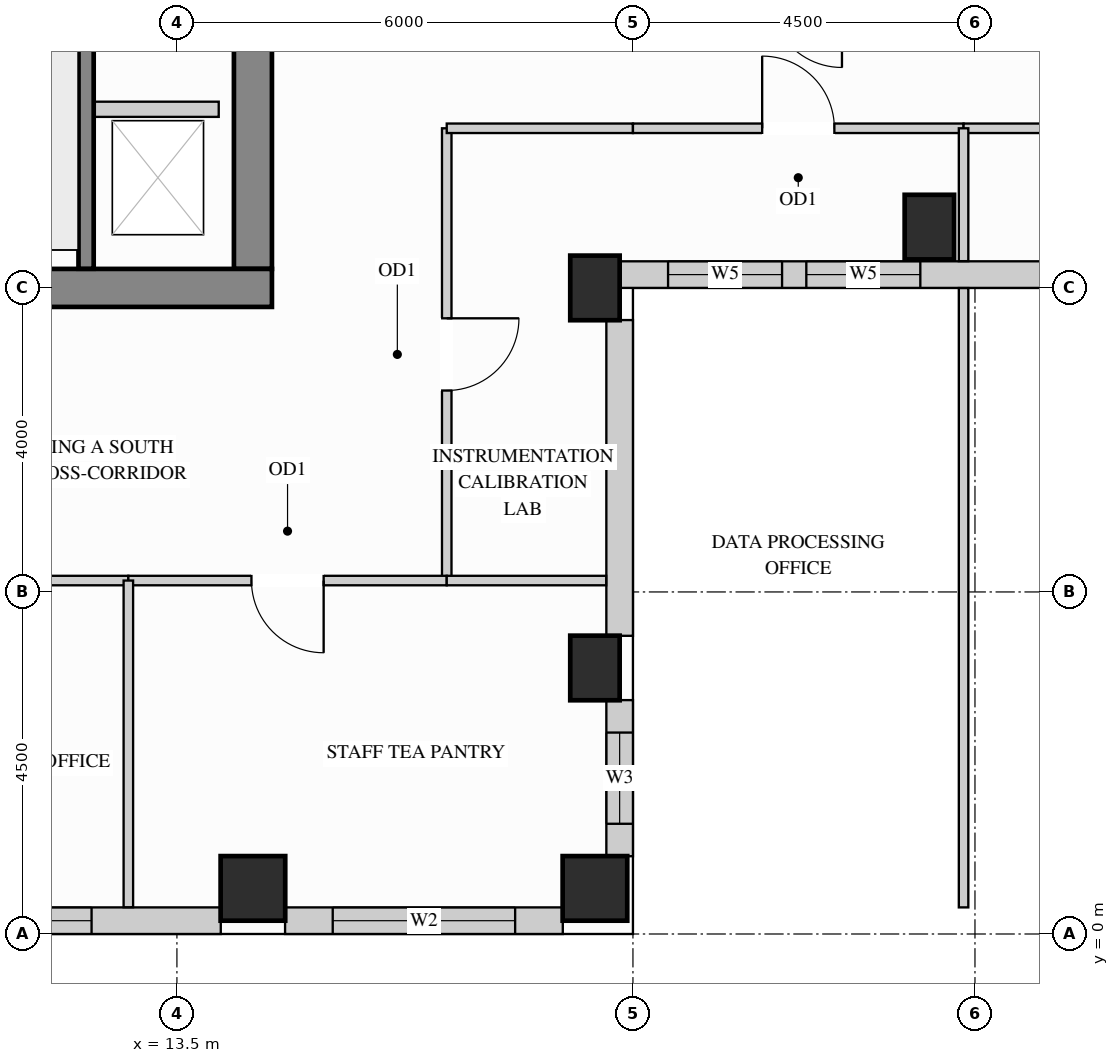
"""IFC4 building model, lengths in metres.
Left out: names, types, materials, properties, quantities, classifications, styles, units other than length and angle.
Written with IfcOpenShell. Run it as: python <this file> out.ifc"""

import sys

from ifc_helpers import new_model, si_unit, direction, frame, frame_2d, origin, origin_2d, place, context, subcontext, project, spatial, rectangle, extrude, source, transform, mapped, element, fill, save


model = new_model("IFC4")
c1 = context("Model", 3, precision=1e-05, world=origin(), true_north=direction((0.0, 1.0)))
c2 = subcontext(c1, "Body", "Model", "MODEL_VIEW")
j1 = project(units=[si_unit("LENGTHUNIT", "METRE"), si_unit("PLANEANGLEUNIT", "RADIAN")], contexts=[c1])
p1 = place(None, origin())
s1 = spatial("IfcSite", under=j1, at=p1, CompositionType="ELEMENT")
p2 = place(p1, origin())
s2 = spatial("IfcBuilding", under=s1, at=p2, CompositionType="ELEMENT")
p3 = place(p2, frame((0.0, 0.0, 230.4)))
s3 = spatial("IfcBuildingStorey", under=s2, at=p3, CompositionType="ELEMENT", Elevation=230.4)
m1 = source(origin(), c2, "Body", "SweptSolid", [
    extrude(rectangle(XDim=0.65, YDim=0.85, at=origin_2d()), origin(), (0.0, 0.0, 1.0), 3.4),
])
for number, where, z_axis, x_axis in (
    (1, (19.0, 3.5, 0.0), (0.0, 0.0, 1.0), (1.0, 0.0, 0.0)),
    (2, (19.0, 8.5, 0.0), (0.0, 0.0, 1.0), (1.0, 0.0, 0.0)),
    (3, (23.4, 9.3, 0.0), (0.0, 0.0, 1.0), (1.0, 0.0, 0.0)),
):
    element("IfcColumn", number, at=place(p3, frame(where, z_axis=z_axis, x_axis=x_axis)), inside=s3, PredefinedType="COLUMN", context=c2, shape_type="MappedRepresentation", body=[
        mapped(m1, transform((0.0, 0.0, 0.0), x_axis=(1.0, 0.0, 0.0), y_axis=(0.0, 1.0, 0.0), z_axis=(0.0, 0.0, 1.0))),
    ])
m2 = source(origin(), c2, "Body", "SweptSolid", [
    extrude(rectangle(XDim=0.85, YDim=0.85, at=origin_2d()), origin(), (0.0, 0.0, 1.0), 3.4),
])
for number, where, z_axis, x_axis in (
    (4, (14.5, 0.6, 0.0), (0.0, 0.0, 1.0), (1.0, 0.0, 0.0)),
    (5, (19.0, 0.6, 0.0), (0.0, 0.0, 1.0), (1.0, 0.0, 0.0)),
):
    element("IfcColumn", number, at=place(p3, frame(where, z_axis=z_axis, x_axis=x_axis)), inside=s3, PredefinedType="COLUMN", context=c2, shape_type="MappedRepresentation", body=[
        mapped(m2, transform((0.0, 0.0, 0.0), x_axis=(1.0, 0.0, 0.0), y_axis=(0.0, 1.0, 0.0), z_axis=(0.0, 0.0, 1.0))),
    ])
m3 = source(origin(), c2, "Body", "SweptSolid", [
    extrude(rectangle(XDim=10.07, YDim=0.5, at=frame_2d((5.035, 0.0))), origin(), (0.0, 0.0, 1.0), 3.4),
])
p4 = place(p3, frame((14.5, 8.75, 0.0), z_axis=(0.0, 0.0, 1.0), x_axis=(0.0, 1.0, 0.0)))
e6 = element("IfcWall", 6, at=p4, inside=s3, PredefinedType="SHEAR", context=c2, shape_type="MappedRepresentation", body=[
    mapped(m3, transform((0.0, 0.0, 0.0), x_axis=(1.0, 0.0, 0.0), y_axis=(0.0, 1.0, 0.0), z_axis=(0.0, 0.0, 1.0))),
])
m4 = source(origin(), c2, "Body", "SweptSolid", [
    extrude(rectangle(XDim=10.5, YDim=0.5, at=frame_2d((5.25, 0.0))), origin(), (0.0, 0.0, 1.0), 3.4),
])
p5 = place(p3, frame((4.25, 8.5, 0.0), z_axis=(0.0, 0.0, 1.0), x_axis=(1.0, 0.0, 0.0)))
e7 = element("IfcWall", 7, at=p5, inside=s3, PredefinedType="SHEAR", context=c2, shape_type="MappedRepresentation", body=[
    mapped(m4, transform((0.0, 0.0, 0.0), x_axis=(1.0, 0.0, 0.0), y_axis=(0.0, 1.0, 0.0), z_axis=(0.0, 0.0, 1.0))),
])
p6 = place(p3, frame((9.423, 0.175, 0.0), z_axis=(0.0, 0.0, 1.0), x_axis=(1.0, 0.0, 0.0)))
e8 = element("IfcWall", 8, at=p6, inside=s3, PredefinedType="SOLIDWALL", context=c2, shape_type="SweptSolid", body=[
    extrude(rectangle(XDim=4.654, YDim=0.35, at=frame_2d((2.327, 0.0))), origin(), (0.0, 0.0, 1.0), 3.385),
])
p7 = place(p6, frame((0.554, 0.0, 0.78)))
e9 = element("IfcOpeningElement", 9, at=p7, cuts=e8, PredefinedType="OPENING", context=c2, shape_type="SweptSolid", body=[
    extrude(rectangle(XDim=2.4, YDim=2.1, at=frame_2d((1.2, 1.05))), frame((0.0, 0.185, 0.0), z_axis=(0.0, -1.0, 0.0), x_axis=(1.0, 0.0, 0.0)), (0.0, 0.0, 1.0), 0.37),
])
p8 = place(p3, frame((14.923, 0.175, 0.0), z_axis=(0.0, 0.0, 1.0), x_axis=(1.0, 0.0, 0.0)))
e10 = element("IfcWall", 10, at=p8, inside=s3, PredefinedType="SOLIDWALL", context=c2, shape_type="SweptSolid", body=[
    extrude(rectangle(XDim=3.654, YDim=0.35, at=frame_2d((1.827, 0.0))), origin(), (0.0, 0.0, 1.0), 3.385),
])
p9 = place(p8, frame((0.627, 0.0, 0.78)))
e11 = element("IfcOpeningElement", 11, at=p9, cuts=e10, PredefinedType="OPENING", context=c2, shape_type="SweptSolid", body=[
    extrude(rectangle(XDim=2.4, YDim=2.1, at=frame_2d((1.2, 1.05))), frame((0.0, 0.185, 0.0), z_axis=(0.0, -1.0, 0.0), x_axis=(1.0, 0.0, 0.0)), (0.0, 0.0, 1.0), 0.37),
])
p10 = place(p3, frame((19.325, 1.023, 0.0), z_axis=(0.0, 0.0, 1.0), x_axis=(0.0, 1.0, 0.0)))
e12 = element("IfcWall", 12, at=p10, inside=s3, PredefinedType="SOLIDWALL", context=c2, shape_type="SweptSolid", body=[
    extrude(rectangle(XDim=2.054, YDim=0.35, at=frame_2d((1.027, 0.0))), origin(), (0.0, 0.0, 1.0), 2.619),
])
p11 = place(p10, frame((0.427, 0.0, 0.78)))
e13 = element("IfcOpeningElement", 13, at=p11, cuts=e12, PredefinedType="OPENING", context=c2, shape_type="SweptSolid", body=[
    extrude(rectangle(XDim=1.2, YDim=1.659, at=frame_2d((0.6, 0.83))), frame((0.0, 0.185, 0.0), z_axis=(0.0, -1.0, 0.0), x_axis=(1.0, 0.0, 0.0)), (0.0, 0.0, 1.0), 0.37),
])
m5 = source(origin(), c2, "Body", "SweptSolid", [
    extrude(rectangle(XDim=4.154, YDim=0.35, at=frame_2d((2.077, 0.0))), origin(), (0.0, 0.0, 1.0), 2.619),
])
p12 = place(p3, frame((19.325, 3.923, 0.0), z_axis=(0.0, 0.0, 1.0), x_axis=(0.0, 1.0, 0.0)))
e14 = element("IfcWall", 14, at=p12, inside=s3, PredefinedType="SOLIDWALL", context=c2, shape_type="MappedRepresentation", body=[
    mapped(m5, transform((0.0, 0.0, 0.0), x_axis=(1.0, 0.0, 0.0), y_axis=(0.0, 1.0, 0.0), z_axis=(0.0, 0.0, 1.0))),
])
p13 = place(p3, frame((19.323, 8.675, 0.0), z_axis=(0.0, 0.0, 1.0), x_axis=(1.0, 0.0, 0.0)))
e15 = element("IfcWall", 15, at=p13, inside=s3, PredefinedType="SOLIDWALL", context=c2, shape_type="SweptSolid", body=[
    extrude(rectangle(XDim=15.427, YDim=0.35, at=frame_2d((7.713, 0.0))), origin(), (0.0, 0.0, 1.0), 3.385),
])
p14 = place(p13, frame((0.639, 0.0, 0.78)))
e16 = element("IfcOpeningElement", 16, at=p14, cuts=e15, PredefinedType="OPENING", context=c2, shape_type="SweptSolid", body=[
    extrude(rectangle(XDim=1.5, YDim=2.0, at=frame_2d((0.75, 1.0))), frame((0.0, 0.185, 0.0), z_axis=(0.0, -1.0, 0.0), x_axis=(1.0, 0.0, 0.0)), (0.0, 0.0, 1.0), 0.37),
])
p15 = place(p13, frame((2.458, 0.0, 0.78)))
e17 = element("IfcOpeningElement", 17, at=p15, cuts=e15, PredefinedType="OPENING", context=c2, shape_type="SweptSolid", body=[
    extrude(rectangle(XDim=1.5, YDim=2.0, at=frame_2d((0.75, 1.0))), frame((0.0, 0.185, 0.0), z_axis=(0.0, -1.0, 0.0), x_axis=(1.0, 0.0, 0.0)), (0.0, 0.0, 1.0), 0.37),
])
p16 = place(p13, frame((5.61, 0.0, 0.78)))
e18 = element("IfcOpeningElement", 18, at=p16, cuts=e15, PredefinedType="OPENING", context=c2, shape_type="SweptSolid", body=[
    extrude(rectangle(XDim=1.5, YDim=2.0, at=frame_2d((0.75, 1.0))), frame((0.0, 0.185, 0.0), z_axis=(0.0, -1.0, 0.0), x_axis=(1.0, 0.0, 0.0)), (0.0, 0.0, 1.0), 0.37),
])
p17 = place(p13, frame((7.944, 0.0, 0.78)))
e19 = element("IfcOpeningElement", 19, at=p17, cuts=e15, PredefinedType="OPENING", context=c2, shape_type="SweptSolid", body=[
    extrude(rectangle(XDim=1.5, YDim=2.0, at=frame_2d((0.75, 1.0))), frame((0.0, 0.185, 0.0), z_axis=(0.0, -1.0, 0.0), x_axis=(1.0, 0.0, 0.0)), (0.0, 0.0, 1.0), 0.37),
])
p18 = place(p13, frame((11.22, 0.0, 0.78)))
e20 = element("IfcOpeningElement", 20, at=p18, cuts=e15, PredefinedType="OPENING", context=c2, shape_type="SweptSolid", body=[
    extrude(rectangle(XDim=1.5, YDim=2.0, at=frame_2d((0.75, 1.0))), frame((0.0, 0.185, 0.0), z_axis=(0.0, -1.0, 0.0), x_axis=(1.0, 0.0, 0.0)), (0.0, 0.0, 1.0), 0.37),
])
p19 = place(p13, frame((13.164, 0.0, 0.78)))
e21 = element("IfcOpeningElement", 21, at=p19, cuts=e15, PredefinedType="OPENING", context=c2, shape_type="SweptSolid", body=[
    extrude(rectangle(XDim=1.5, YDim=2.0, at=frame_2d((0.75, 1.0))), frame((0.0, 0.185, 0.0), z_axis=(0.0, -1.0, 0.0), x_axis=(1.0, 0.0, 0.0)), (0.0, 0.0, 1.0), 0.37),
])
p20 = place(p3, frame((17.05, 4.65, 0.0), z_axis=(0.0, 0.0, 1.0), x_axis=(0.0, 1.0, 0.0)))
e22 = element("IfcWall", 22, at=p20, inside=s3, PredefinedType="PARTITIONING", context=c2, shape_type="SweptSolid", body=[
    extrude(rectangle(XDim=5.95, YDim=0.125, at=frame_2d((2.975, 0.0))), origin(), (0.0, 0.0, 1.0), 3.385),
])
p21 = place(p20, frame((2.5, 0.0, 0.0)))
e23 = element("IfcOpeningElement", 23, at=p21, cuts=e22, PredefinedType="OPENING", context=c2, shape_type="SweptSolid", body=[
    extrude(rectangle(XDim=0.95, YDim=2.15, at=frame_2d((0.475, 1.075))), frame((0.0, 0.073, 0.0), z_axis=(0.0, -1.0, 0.0), x_axis=(1.0, 0.0, 0.0)), (0.0, 0.0, 1.0), 0.145),
])
m6 = source(origin(), c2, "Body", "SweptSolid", [
    extrude(rectangle(XDim=2.45, YDim=0.125, at=frame_2d((1.225, 0.0))), origin(), (0.0, 0.0, 1.0), 3.385),
])
p22 = place(p3, frame((17.05, 10.6, 0.0), z_axis=(0.0, 0.0, 1.0), x_axis=(1.0, 0.0, 0.0)))
e24 = element("IfcWall", 24, at=p22, inside=s3, PredefinedType="PARTITIONING", context=c2, shape_type="MappedRepresentation", body=[
    mapped(m6, transform((0.0, 0.0, 0.0), x_axis=(1.0, 0.0, 0.0), y_axis=(0.0, 1.0, 0.0), z_axis=(0.0, 0.0, 1.0))),
])
p23 = place(p3, frame((19.5, 10.6, 0.0), z_axis=(0.0, 0.0, 1.0), x_axis=(1.0, 0.0, 0.0)))
e25 = element("IfcWall", 25, at=p23, inside=s3, PredefinedType="PARTITIONING", context=c2, shape_type="SweptSolid", body=[
    extrude(rectangle(XDim=4.35, YDim=0.125, at=frame_2d((2.175, 0.0))), origin(), (0.0, 0.0, 1.0), 3.385),
])
p24 = place(p23, frame((1.7, 0.0, 0.0)))
e26 = element("IfcOpeningElement", 26, at=p24, cuts=e25, PredefinedType="OPENING", context=c2, shape_type="SweptSolid", body=[
    extrude(rectangle(XDim=0.95, YDim=2.15, at=frame_2d((0.475, 1.075))), frame((0.0, 0.073, 0.0), z_axis=(0.0, -1.0, 0.0), x_axis=(1.0, 0.0, 0.0)), (0.0, 0.0, 1.0), 0.145),
])
p25 = place(p3, frame((23.85, 10.6, 0.0), z_axis=(0.0, 0.0, 1.0), x_axis=(1.0, 0.0, 0.0)))
e27 = element("IfcWall", 27, at=p25, inside=s3, PredefinedType="PARTITIONING", context=c2, shape_type="SweptSolid", body=[
    extrude(rectangle(XDim=6.0, YDim=0.125, at=frame_2d((3.0, 0.0))), origin(), (0.0, 0.0, 1.0), 3.385),
])
p26 = place(p25, frame((2.525, 0.0, 0.0)))
e28 = element("IfcOpeningElement", 28, at=p26, cuts=e27, PredefinedType="OPENING", context=c2, shape_type="SweptSolid", body=[
    extrude(rectangle(XDim=0.95, YDim=2.15, at=frame_2d((0.475, 1.075))), frame((0.0, 0.073, 0.0), z_axis=(0.0, -1.0, 0.0), x_axis=(1.0, 0.0, 0.0)), (0.0, 0.0, 1.0), 0.145),
])
m7 = source(origin(), c2, "Body", "SweptSolid", [
    extrude(rectangle(XDim=8.148, YDim=0.125, at=frame_2d((4.074, 0.0))), origin(), (0.0, 0.0, 1.0), 3.385),
])
p27 = place(p3, frame((23.85, 0.35, 0.0), z_axis=(0.0, 0.0, 1.0), x_axis=(0.0, 1.0, 0.0)))
e29 = element("IfcWall", 29, at=p27, inside=s3, PredefinedType="PARTITIONING", context=c2, shape_type="MappedRepresentation", body=[
    mapped(m7, transform((0.0, 0.0, 0.0), x_axis=(1.0, 0.0, 0.0), y_axis=(0.0, 1.0, 0.0), z_axis=(0.0, 0.0, 1.0))),
])
m8 = source(origin(), c2, "Body", "SweptSolid", [
    extrude(rectangle(XDim=1.748, YDim=0.125, at=frame_2d((0.874, 0.0))), origin(), (0.0, 0.0, 1.0), 3.385),
])
p28 = place(p3, frame((23.85, 8.852, 0.0), z_axis=(0.0, 0.0, 1.0), x_axis=(0.0, 1.0, 0.0)))
e30 = element("IfcWall", 30, at=p28, inside=s3, PredefinedType="PARTITIONING", context=c2, shape_type="MappedRepresentation", body=[
    mapped(m8, transform((0.0, 0.0, 0.0), x_axis=(1.0, 0.0, 0.0), y_axis=(0.0, 1.0, 0.0), z_axis=(0.0, 0.0, 1.0))),
])
p29 = place(p3, frame((7.234, 4.65, 0.0), z_axis=(0.0, 0.0, 1.0), x_axis=(1.0, 0.0, 0.0)))
e31 = element("IfcWall", 31, at=p29, inside=s3, PredefinedType="PARTITIONING", context=c2, shape_type="SweptSolid", body=[
    extrude(rectangle(XDim=5.627, YDim=0.125, at=frame_2d((2.813, 0.0))), origin(), (0.0, 0.0, 1.0), 2.848),
])
p30 = place(p29, frame((2.338, 0.0, 0.0)))
e32 = element("IfcOpeningElement", 32, at=p30, cuts=e31, PredefinedType="OPENING", context=c2, shape_type="SweptSolid", body=[
    extrude(rectangle(XDim=0.95, YDim=2.15, at=frame_2d((0.475, 1.075))), frame((0.0, 0.073, 0.0), z_axis=(0.0, -1.0, 0.0), x_axis=(1.0, 0.0, 0.0)), (0.0, 0.0, 1.0), 0.145),
])
p31 = place(p3, frame((12.861, 4.65, 0.0), z_axis=(0.0, 0.0, 1.0), x_axis=(1.0, 0.0, 0.0)))
e33 = element("IfcWall", 33, at=p31, inside=s3, PredefinedType="PARTITIONING", context=c2, shape_type="SweptSolid", body=[
    extrude(rectangle(XDim=4.189, YDim=0.125, at=frame_2d((2.094, 0.0))), origin(), (0.0, 0.0, 1.0), 2.848),
])
p32 = place(p31, frame((1.619, 0.0, 0.0)))
e34 = element("IfcOpeningElement", 34, at=p32, cuts=e33, PredefinedType="OPENING", context=c2, shape_type="SweptSolid", body=[
    extrude(rectangle(XDim=0.95, YDim=2.15, at=frame_2d((0.475, 1.075))), frame((0.0, 0.073, 0.0), z_axis=(0.0, -1.0, 0.0), x_axis=(1.0, 0.0, 0.0)), (0.0, 0.0, 1.0), 0.145),
])
m9 = source(origin(), c2, "Body", "SweptSolid", [
    extrude(rectangle(XDim=2.098, YDim=0.125, at=frame_2d((1.049, 0.0))), origin(), (0.0, 0.0, 1.0), 2.848),
])
p33 = place(p3, frame((17.05, 4.65, 0.0), z_axis=(0.0, 0.0, 1.0), x_axis=(1.0, 0.0, 0.0)))
e35 = element("IfcWall", 35, at=p33, inside=s3, PredefinedType="PARTITIONING", context=c2, shape_type="MappedRepresentation", body=[
    mapped(m9, transform((0.0, 0.0, 0.0), x_axis=(1.0, 0.0, 0.0), y_axis=(0.0, 1.0, 0.0), z_axis=(0.0, 0.0, 1.0))),
])
m10 = source(origin(), c2, "Body", "SweptSolid", [
    extrude(rectangle(XDim=4.298, YDim=0.125, at=frame_2d((2.149, 0.0))), origin(), (0.0, 0.0, 1.0), 3.385),
])
p34 = place(p3, frame((12.861, 0.352, 0.0), z_axis=(0.0, 0.0, 1.0), x_axis=(0.0, 1.0, 0.0)))
e36 = element("IfcWall", 36, at=p34, inside=s3, PredefinedType="PARTITIONING", context=c2, shape_type="MappedRepresentation", body=[
    mapped(m10, transform((0.0, 0.0, 0.0), x_axis=(1.0, 0.0, 0.0), y_axis=(0.0, 1.0, 0.0), z_axis=(0.0, 0.0, 1.0))),
])
m11 = source(origin(), c2, "Body", "SweptSolid", [
    extrude(rectangle(XDim=1.63, YDim=0.2, at=frame_2d((0.815, 0.0))), origin(), (0.0, 0.0, 1.0), 3.385),
])
p35 = place(p3, frame((12.42, 10.85, 0.0), z_axis=(0.0, 0.0, 1.0), x_axis=(1.0, 0.0, 0.0)))
e37 = element("IfcWall", 37, at=p35, inside=s3, PredefinedType="PARTITIONING", context=c2, shape_type="MappedRepresentation", body=[
    mapped(m11, transform((0.0, 0.0, 0.0), x_axis=(1.0, 0.0, 0.0), y_axis=(0.0, 1.0, 0.0), z_axis=(0.0, 0.0, 1.0))),
])
m12 = source(origin(), c2, "Body", "SweptSolid", [
    extrude(rectangle(XDim=3.803, YDim=0.2, at=frame_2d((1.901, 0.0))), origin(), (0.0, 0.0, 1.0), 3.4),
])
p36 = place(p3, frame((12.305, 8.752, 0.0), z_axis=(0.0, 0.0, 1.0), x_axis=(0.0, 1.0, 0.0)))
e38 = element("IfcWall", 38, at=p36, inside=s3, PredefinedType="SHEAR", context=c2, shape_type="MappedRepresentation", body=[
    mapped(m12, transform((0.0, 0.0, 0.0), x_axis=(1.0, 0.0, 0.0), y_axis=(0.0, 1.0, 0.0), z_axis=(0.0, 0.0, 1.0))),
])
m13 = source(origin(), c2, "Body", "SweptSolid", [
    extrude(rectangle(XDim=0.95, YDim=2.15, at=frame_2d((0.475, 1.075))), frame((0.0, 0.025, 0.0), z_axis=(0.0, -1.0, 0.0), x_axis=(1.0, 0.0, 0.0)), (0.0, 0.0, 1.0), 0.05),
])
p37 = place(p21, origin())
e39 = element("IfcDoor", 39, at=p37, inside=s3, OperationType="SINGLE_SWING_RIGHT", PredefinedType="DOOR", context=c2, shape_type="MappedRepresentation", body=[
    mapped(m13, transform((0.0, 0.0, 0.0), x_axis=(1.0, 0.0, 0.0), y_axis=(0.0, 1.0, 0.0), z_axis=(0.0, 0.0, 1.0))),
])
fill(e23, e39)
p38 = place(p32, origin())
e40 = element("IfcDoor", 40, at=p38, inside=s3, OperationType="SINGLE_SWING_RIGHT", PredefinedType="DOOR", context=c2, shape_type="MappedRepresentation", body=[
    mapped(m13, transform((0.0, 0.0, 0.0), x_axis=(1.0, 0.0, 0.0), y_axis=(0.0, 1.0, 0.0), z_axis=(0.0, 0.0, 1.0))),
])
fill(e34, e40)
p39 = place(p24, origin())
e41 = element("IfcDoor", 41, at=p39, inside=s3, OperationType="SINGLE_SWING_LEFT", PredefinedType="DOOR", context=c2, shape_type="MappedRepresentation", body=[
    mapped(m13, transform((0.0, 0.0, 0.0), x_axis=(1.0, 0.0, 0.0), y_axis=(0.0, 1.0, 0.0), z_axis=(0.0, 0.0, 1.0))),
])
fill(e26, e41)
m14 = source(origin(), c2, "Body", "SweptSolid", [
    extrude(rectangle(XDim=2.4, YDim=2.1, at=frame_2d((1.2, 1.05))), frame((0.0, 0.03, 0.0), z_axis=(0.0, -1.0, 0.0), x_axis=(1.0, 0.0, 0.0)), (0.0, 0.0, 1.0), 0.06),
])
p40 = place(p7, origin())
e42 = element("IfcWindow", 42, at=p40, inside=s3, PartitioningType="SINGLE_PANEL", PredefinedType="WINDOW", context=c2, shape_type="MappedRepresentation", body=[
    mapped(m14, transform((0.0, 0.0, 0.0), x_axis=(1.0, 0.0, 0.0), y_axis=(0.0, 1.0, 0.0), z_axis=(0.0, 0.0, 1.0))),
])
fill(e9, e42)
p41 = place(p9, origin())
e43 = element("IfcWindow", 43, at=p41, inside=s3, PartitioningType="SINGLE_PANEL", PredefinedType="WINDOW", context=c2, shape_type="MappedRepresentation", body=[
    mapped(m14, transform((0.0, 0.0, 0.0), x_axis=(1.0, 0.0, 0.0), y_axis=(0.0, 1.0, 0.0), z_axis=(0.0, 0.0, 1.0))),
])
fill(e11, e43)
m15 = source(origin(), c2, "Body", "SweptSolid", [
    extrude(rectangle(XDim=1.2, YDim=1.659, at=frame_2d((0.6, 0.83))), frame((0.0, 0.03, 0.0), z_axis=(0.0, -1.0, 0.0), x_axis=(1.0, 0.0, 0.0)), (0.0, 0.0, 1.0), 0.06),
])
p42 = place(p11, origin())
e44 = element("IfcWindow", 44, at=p42, inside=s3, PartitioningType="SINGLE_PANEL", PredefinedType="WINDOW", context=c2, shape_type="MappedRepresentation", body=[
    mapped(m15, transform((0.0, 0.0, 0.0), x_axis=(1.0, 0.0, 0.0), y_axis=(0.0, 1.0, 0.0), z_axis=(0.0, 0.0, 1.0))),
])
fill(e13, e44)
m16 = source(origin(), c2, "Body", "SweptSolid", [
    extrude(rectangle(XDim=1.5, YDim=2.0, at=frame_2d((0.75, 1.0))), frame((0.0, 0.03, 0.0), z_axis=(0.0, -1.0, 0.0), x_axis=(1.0, 0.0, 0.0)), (0.0, 0.0, 1.0), 0.06),
])
p43 = place(p14, origin())
e45 = element("IfcWindow", 45, at=p43, inside=s3, PartitioningType="SINGLE_PANEL", PredefinedType="WINDOW", context=c2, shape_type="MappedRepresentation", body=[
    mapped(m16, transform((0.0, 0.0, 0.0), x_axis=(1.0, 0.0, 0.0), y_axis=(0.0, 1.0, 0.0), z_axis=(0.0, 0.0, 1.0))),
])
fill(e16, e45)
p44 = place(p15, origin())
e46 = element("IfcWindow", 46, at=p44, inside=s3, PartitioningType="SINGLE_PANEL", PredefinedType="WINDOW", context=c2, shape_type="MappedRepresentation", body=[
    mapped(m16, transform((0.0, 0.0, 0.0), x_axis=(1.0, 0.0, 0.0), y_axis=(0.0, 1.0, 0.0), z_axis=(0.0, 0.0, 1.0))),
])
fill(e17, e46)
save(model, sys.argv[1])
